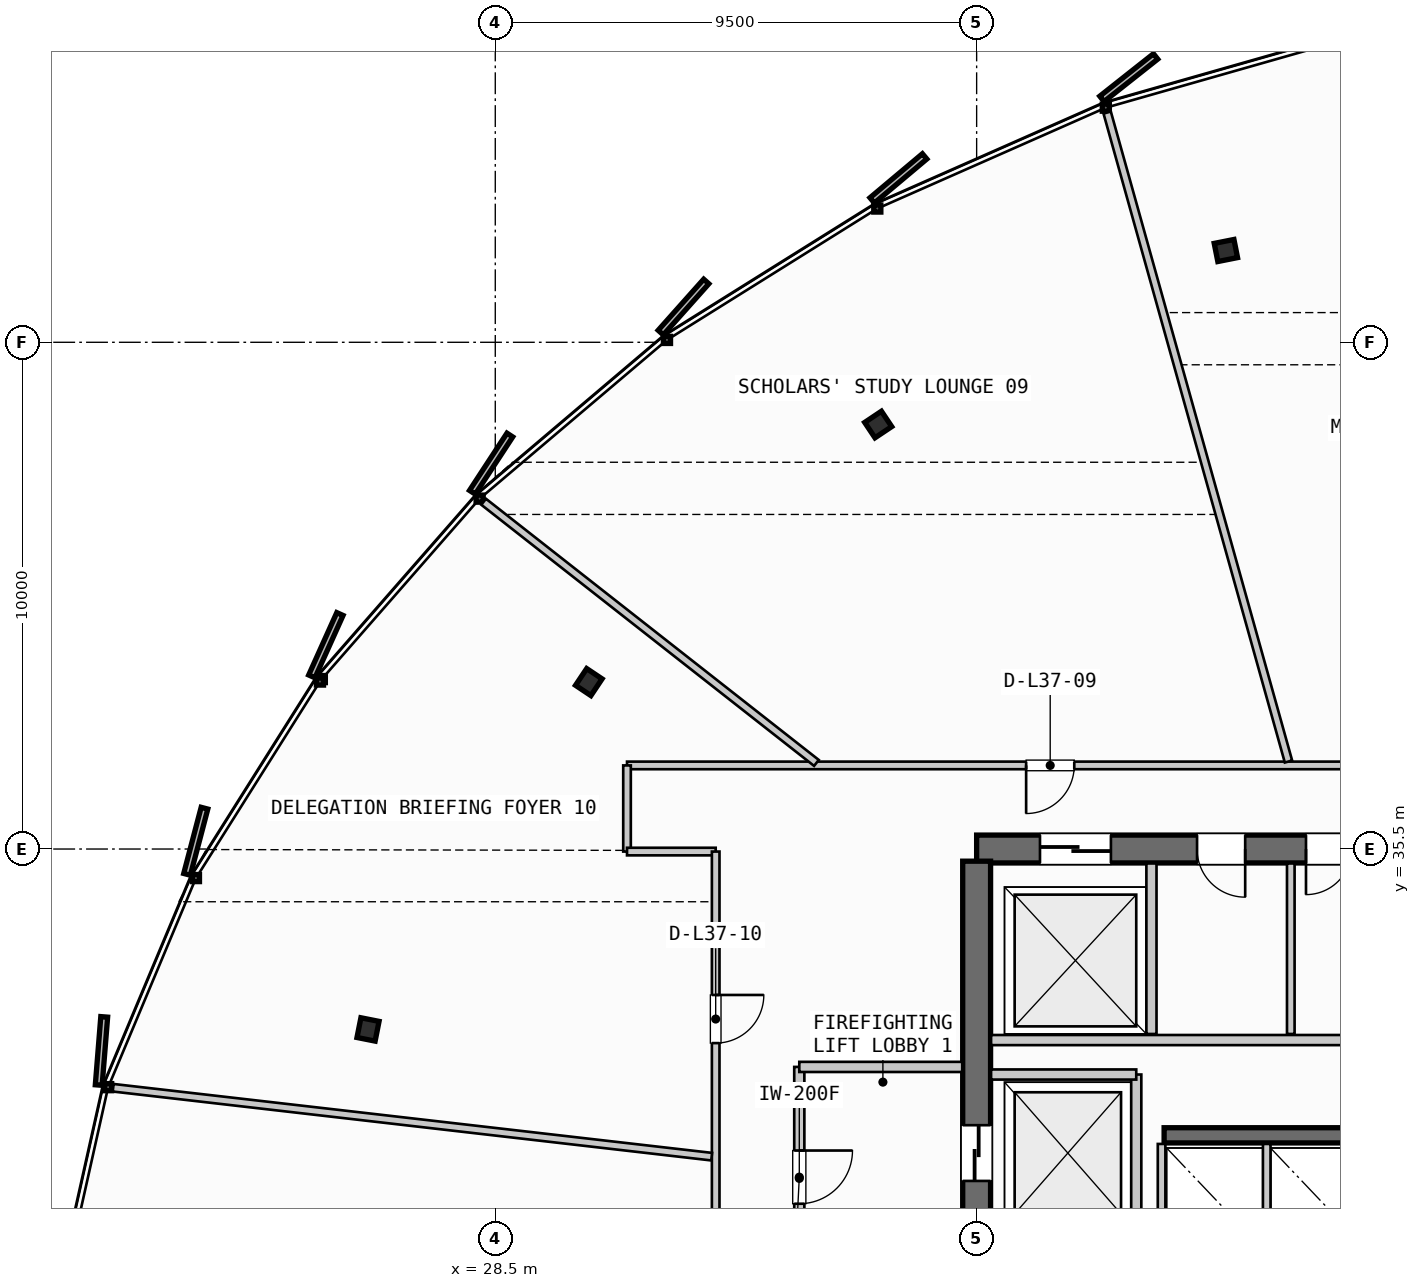
"""IFC4 building model, lengths in metres.
Left out: names, types, materials, properties, quantities, classifications, styles, units other than length and angle.
Written with IfcOpenShell. Run it as: python <this file> out.ifc"""

import sys

from ifc_helpers import new_model, si_unit, direction, frame, frame_2d, origin, origin_2d, place, context, subcontext, project, spatial, rectangle, i_section, extrude, source, transform, mapped, element, fill, save


model = new_model("IFC4")
c1 = context("Model", 3, precision=1e-05, world=origin(), true_north=direction((0.0, 1.0)))
c2 = subcontext(c1, "Body", "Model", "MODEL_VIEW")
j1 = project(units=[si_unit("LENGTHUNIT", "METRE"), si_unit("PLANEANGLEUNIT", "RADIAN")], contexts=[c1])
p1 = place(None, origin())
s1 = spatial("IfcSite", under=j1, at=p1, CompositionType="ELEMENT")
p2 = place(p1, origin())
s2 = spatial("IfcBuilding", under=s1, at=p2, CompositionType="ELEMENT")
p3 = place(p2, frame((0.0, 0.0, 146.55)))
s3 = spatial("IfcBuildingStorey", under=s2, at=p3, CompositionType="ELEMENT", Elevation=146.55)
p4 = place(p3, frame((55.6, 35.5, 0.0), z_axis=(0.0, 0.0, 1.0), x_axis=(-1.0, 0.0, 0.0)))
e1 = element("IfcWall", 1, at=p4, inside=s3, PredefinedType="SHEAR", context=c2, shape_type="SweptSolid", body=[
    extrude(rectangle(XDim=17.6, YDim=0.55, at=frame_2d((8.8, 0.0))), origin(), (0.0, 0.0, 1.0), 3.3),
])
p5 = place(p4, frame((8.05, 0.0, 0.0)))
e2 = element("IfcOpeningElement", 2, at=p5, cuts=e1, PredefinedType="OPENING", context=c2, shape_type="SweptSolid", body=[
    extrude(rectangle(XDim=1.5, YDim=2.2, at=frame_2d((0.75, 1.1))), frame((0.0, 0.285, 0.0), z_axis=(0.0, -1.0, 0.0), x_axis=(1.0, 0.0, 0.0)), (0.0, 0.0, 1.0), 0.57),
])
p6 = place(p4, frame((14.95, 0.0, 0.0)))
e3 = element("IfcOpeningElement", 3, at=p6, cuts=e1, PredefinedType="OPENING", context=c2, shape_type="SweptSolid", body=[
    extrude(rectangle(XDim=1.4, YDim=2.3, at=frame_2d((0.7, 1.15))), frame((0.0, 0.285, 0.0), z_axis=(0.0, -1.0, 0.0), x_axis=(1.0, 0.0, 0.0)), (0.0, 0.0, 1.0), 0.57),
])
p7 = place(p4, frame((12.3, 0.0, 0.0)))
e4 = element("IfcOpeningElement", 4, at=p7, cuts=e1, PredefinedType="OPENING", context=c2, shape_type="SweptSolid", body=[
    extrude(rectangle(XDim=0.95, YDim=2.15, at=frame_2d((0.475, 1.075))), frame((0.0, 0.285, 0.0), z_axis=(0.0, -1.0, 0.0), x_axis=(1.0, 0.0, 0.0)), (0.0, 0.0, 1.0), 0.57),
])
p8 = place(p4, frame((10.2, 0.0, 0.0)))
e5 = element("IfcOpeningElement", 5, at=p8, cuts=e1, PredefinedType="OPENING", context=c2, shape_type="SweptSolid", body=[
    extrude(rectangle(XDim=0.9, YDim=2.15, at=frame_2d((0.45, 1.075))), frame((0.0, 0.285, 0.0), z_axis=(0.0, -1.0, 0.0), x_axis=(1.0, 0.0, 0.0)), (0.0, 0.0, 1.0), 0.57),
])
p9 = place(p3, frame((38.0, 35.26, 0.0), z_axis=(0.0, 0.0, 1.0), x_axis=(0.0, -1.0, 0.0)))
e6 = element("IfcWall", 6, at=p9, inside=s3, PredefinedType="SHEAR", context=c2, shape_type="SweptSolid", body=[
    extrude(rectangle(XDim=14.92, YDim=0.55, at=frame_2d((7.46, 0.0))), origin(), (0.0, 0.0, 1.0), 3.3),
])
p10 = place(p9, frame((5.21, 0.0, 0.0)))
e7 = element("IfcOpeningElement", 7, at=p10, cuts=e6, PredefinedType="OPENING", context=c2, shape_type="SweptSolid", body=[
    extrude(rectangle(XDim=1.1, YDim=2.2, at=frame_2d((0.55, 1.1))), frame((0.0, 0.285, 0.0), z_axis=(0.0, -1.0, 0.0), x_axis=(1.0, 0.0, 0.0)), (0.0, 0.0, 1.0), 0.57),
])
p11 = place(p3, frame((41.7, 29.85, 0.0), z_axis=(0.0, 0.0, 1.0), x_axis=(1.0, 0.0, 0.0)))
e8 = element("IfcWall", 8, at=p11, inside=s3, PredefinedType="SHEAR", context=c2, shape_type="SweptSolid", body=[
    extrude(rectangle(XDim=4.25, YDim=0.3, at=frame_2d((2.125, 0.0))), origin(), (0.0, 0.0, 1.0), 3.3),
])
m1 = source(origin(), c2, "Body", "SweptSolid", [
    extrude(i_section(OverallWidth=0.397, OverallDepth=0.365, WebThickness=0.028, FlangeThickness=0.044, FilletRadius=0.015, at=origin_2d()), origin(), (0.0, 0.0, 1.0), 3.3),
])
for number, where, z_axis, x_axis in (
    (9, (42.919, 47.311, 0.0), (0.0, 0.0, 1.0), (-0.195, 0.981, 0.0)),
    (10, (36.058, 43.877, 0.0), (0.0, 0.0, 1.0), (-0.556, 0.831, 0.0)),
    (11, (30.346, 38.794, 0.0), (0.0, 0.0, 1.0), (-0.831, 0.556, 0.0)),
    (12, (25.989, 31.94, 0.0), (0.0, 0.0, 1.0), (-0.981, 0.195, 0.0)),
):
    element("IfcColumn", number, at=place(p3, frame(where, z_axis=z_axis, x_axis=x_axis)), inside=s3, PredefinedType="COLUMN", context=c2, shape_type="MappedRepresentation", body=[
        mapped(m1, transform((0.0, 0.0, 0.0), scale=1.0)),
    ])
p12 = place(p3, frame((41.15, 27.95, 0.0), z_axis=(0.0, 0.0, 1.0), x_axis=(0.0, 1.0, 0.0)))
e13 = element("IfcWall", 13, at=p12, inside=s3, PredefinedType="PARTITIONING", context=c2, shape_type="SweptSolid", body=[
    extrude(rectangle(XDim=3.1, YDim=0.2, at=frame_2d((1.55, 0.0))), origin(), (0.0, 0.0, 1.0), 2.305),
])
p13 = place(p3, frame((38.285, 31.05, 0.0), z_axis=(0.0, 0.0, 1.0), x_axis=(1.0, 0.0, 0.0)))
e14 = element("IfcWall", 14, at=p13, inside=s3, PredefinedType="PARTITIONING", context=c2, shape_type="SweptSolid", body=[
    extrude(rectangle(XDim=2.865, YDim=0.2, at=frame_2d((1.433, 0.0))), origin(), (0.0, 0.0, 1.0), 2.305),
])
p14 = place(p3, frame((34.5, 31.2, 0.0), z_axis=(0.0, 0.0, 1.0), x_axis=(0.0, -1.0, 0.0)))
e15 = element("IfcWall", 15, at=p14, inside=s3, PredefinedType="PARTITIONING", context=c2, shape_type="SweptSolid", body=[
    extrude(rectangle(XDim=4.4, YDim=0.2, at=frame_2d((2.2, 0.0))), origin(), (0.0, 0.0, 1.0), 2.305),
])
p15 = place(p14, frame((1.65, 0.0, 0.0)))
e16 = element("IfcOpeningElement", 16, at=p15, cuts=e15, PredefinedType="OPENING", context=c2, shape_type="SweptSolid", body=[
    extrude(rectangle(XDim=1.05, YDim=2.15, at=frame_2d((0.525, 1.075))), frame((0.0, 0.11, 0.0), z_axis=(0.0, -1.0, 0.0), x_axis=(1.0, 0.0, 0.0)), (0.0, 0.0, 1.0), 0.22),
])
p16 = place(p3, frame((34.5, 31.2, 0.0), z_axis=(0.0, 0.0, 1.0), x_axis=(1.0, 0.0, 0.0)))
e17 = element("IfcWall", 17, at=p16, inside=s3, PredefinedType="PARTITIONING", context=c2, shape_type="SweptSolid", body=[
    extrude(rectangle(XDim=3.215, YDim=0.2, at=frame_2d((1.607, 0.0))), origin(), (0.0, 0.0, 1.0), 2.305),
])
for number, where, z_axis, x_axis in (
    (18, (41.65, 27.41, 0.0), (0.0, 0.0, 1.0), (0.0, 1.0, 0.0)),
    (19, (43.725, 27.41, 0.0), (0.0, 0.0, 1.0), (0.0, 1.0, 0.0)),
):
    element("IfcWall", number, at=place(p3, frame(where, z_axis=z_axis, x_axis=x_axis)), inside=s3, PredefinedType="PARTITIONING", context=c2, shape_type="SweptSolid", body=[
        extrude(rectangle(XDim=2.27, YDim=0.15, at=frame_2d((1.135, 0.0))), origin(), (0.0, 0.0, 1.0), 2.305),
    ])
p17 = place(p3, frame((41.45, 31.85, 0.0), z_axis=(0.0, 0.0, 1.0), x_axis=(0.0, 1.0, 0.0)))
e20 = element("IfcWall", 20, at=p17, inside=s3, PredefinedType="PARTITIONING", context=c2, shape_type="SweptSolid", body=[
    extrude(rectangle(XDim=3.365, YDim=0.2, at=frame_2d((1.683, 0.0))), origin(), (0.0, 0.0, 1.0), 2.305),
])
p18 = place(p3, frame((38.285, 31.73, 0.0), z_axis=(0.0, 0.0, 1.0), x_axis=(1.0, 0.0, 0.0)))
e21 = element("IfcWall", 21, at=p18, inside=s3, PredefinedType="PARTITIONING", context=c2, shape_type="SweptSolid", body=[
    extrude(rectangle(XDim=7.515, YDim=0.2, at=frame_2d((3.758, 0.0))), origin(), (0.0, 0.0, 1.0), 2.305),
])
p19 = place(p3, frame((44.2, 31.85, 0.0), z_axis=(0.0, 0.0, 1.0), x_axis=(0.0, 1.0, 0.0)))
e22 = element("IfcWall", 22, at=p19, inside=s3, PredefinedType="PLUMBINGWALL", context=c2, shape_type="SweptSolid", body=[
    extrude(rectangle(XDim=3.365, YDim=0.15, at=frame_2d((1.683, 0.0))), origin(), (0.0, 0.0, 1.0), 2.305),
])
p20 = place(p3, frame((62.5, 37.15, 0.0), z_axis=(0.0, 0.0, 1.0), x_axis=(-1.0, 0.0, 0.0)))
e23 = element("IfcWall", 23, at=p20, inside=s3, PredefinedType="PARTITIONING", context=c2, shape_type="SweptSolid", body=[
    extrude(rectangle(XDim=31.4, YDim=0.15, at=frame_2d((15.7, 0.0))), origin(), (0.0, 0.0, 1.0), 2.305),
])
p21 = place(p20, frame((7.561, 0.0, 0.0)))
e24 = element("IfcOpeningElement", 24, at=p21, cuts=e23, PredefinedType="OPENING", context=c2, shape_type="SweptSolid", body=[
    extrude(rectangle(XDim=0.95, YDim=2.15, at=frame_2d((0.475, 1.075))), frame((0.0, 0.085, 0.0), z_axis=(0.0, -1.0, 0.0), x_axis=(1.0, 0.0, 0.0)), (0.0, 0.0, 1.0), 0.17),
])
p22 = place(p20, frame((13.901, 0.0, 0.0)))
e25 = element("IfcOpeningElement", 25, at=p22, cuts=e23, PredefinedType="OPENING", context=c2, shape_type="SweptSolid", body=[
    extrude(rectangle(XDim=0.95, YDim=2.15, at=frame_2d((0.475, 1.075))), frame((0.0, 0.085, 0.0), z_axis=(0.0, -1.0, 0.0), x_axis=(1.0, 0.0, 0.0)), (0.0, 0.0, 1.0), 0.17),
])
p23 = place(p20, frame((22.573, 0.0, 0.0)))
e26 = element("IfcOpeningElement", 26, at=p23, cuts=e23, PredefinedType="OPENING", context=c2, shape_type="SweptSolid", body=[
    extrude(rectangle(XDim=0.95, YDim=2.15, at=frame_2d((0.475, 1.075))), frame((0.0, 0.085, 0.0), z_axis=(0.0, -1.0, 0.0), x_axis=(1.0, 0.0, 0.0)), (0.0, 0.0, 1.0), 0.17),
])
p24 = place(p3, frame((31.1, 37.15, 0.0), z_axis=(0.0, 0.0, 1.0), x_axis=(0.0, -1.0, 0.0)))
e27 = element("IfcWall", 27, at=p24, inside=s3, PredefinedType="PARTITIONING", context=c2, shape_type="SweptSolid", body=[
    extrude(rectangle(XDim=1.7, YDim=0.15, at=frame_2d((0.85, 0.0))), origin(), (0.0, 0.0, 1.0), 2.305),
])
p25 = place(p3, frame((31.1, 35.45, 0.0), z_axis=(0.0, 0.0, 1.0), x_axis=(1.0, 0.0, 0.0)))
e28 = element("IfcWall", 28, at=p25, inside=s3, PredefinedType="PARTITIONING", context=c2, shape_type="SweptSolid", body=[
    extrude(rectangle(XDim=1.75, YDim=0.15, at=frame_2d((0.875, 0.0))), origin(), (0.0, 0.0, 1.0), 2.305),
])
p26 = place(p3, frame((32.85, 35.45, 0.0), z_axis=(0.0, 0.0, 1.0), x_axis=(0.0, -1.0, 0.0)))
e29 = element("IfcWall", 29, at=p26, inside=s3, PredefinedType="PARTITIONING", context=c2, shape_type="SweptSolid", body=[
    extrude(rectangle(XDim=15.3, YDim=0.15, at=frame_2d((7.65, 0.0))), origin(), (0.0, 0.0, 1.0), 2.305),
])
p27 = place(p26, frame((2.83, 0.0, 0.0)))
e30 = element("IfcOpeningElement", 30, at=p27, cuts=e29, PredefinedType="OPENING", context=c2, shape_type="SweptSolid", body=[
    extrude(rectangle(XDim=0.95, YDim=2.15, at=frame_2d((0.475, 1.075))), frame((0.0, 0.085, 0.0), z_axis=(0.0, -1.0, 0.0), x_axis=(1.0, 0.0, 0.0)), (0.0, 0.0, 1.0), 0.17),
])
p28 = place(p26, frame((9.899, 0.0, 0.0)))
e31 = element("IfcOpeningElement", 31, at=p28, cuts=e29, PredefinedType="OPENING", context=c2, shape_type="SweptSolid", body=[
    extrude(rectangle(XDim=0.95, YDim=2.15, at=frame_2d((0.475, 1.075))), frame((0.0, 0.085, 0.0), z_axis=(0.0, -1.0, 0.0), x_axis=(1.0, 0.0, 0.0)), (0.0, 0.0, 1.0), 0.17),
])
p29 = place(p3, frame((44.154, 37.227, 0.0), z_axis=(0.0, 0.0, 1.0), x_axis=(-0.269090511443, 0.963114892758, 0.0)))
e32 = element("IfcWall", 32, at=p29, inside=s3, PredefinedType="PARTITIONING", context=c2, shape_type="SweptSolid", body=[
    extrude(rectangle(XDim=13.297, YDim=0.15, at=frame_2d((6.648, 0.0))), origin(), (0.0, 0.0, 1.0), 2.305),
])
p30 = place(p3, frame((34.838, 37.199, 0.0), z_axis=(0.0, 0.0, 1.0), x_axis=(-0.786723081145, 0.617306077723, 0.0)))
e33 = element("IfcWall", 33, at=p30, inside=s3, PredefinedType="PARTITIONING", context=c2, shape_type="SweptSolid", body=[
    extrude(rectangle(XDim=8.348, YDim=0.15, at=frame_2d((4.174, 0.0))), origin(), (0.0, 0.0, 1.0), 2.305),
])
p31 = place(p3, frame((32.771, 29.429, 0.0), z_axis=(0.0, 0.0, 1.0), x_axis=(-0.993435617558, 0.114392629863, 0.0)))
e34 = element("IfcWall", 34, at=p31, inside=s3, PredefinedType="PARTITIONING", context=c2, shape_type="SweptSolid", body=[
    extrude(rectangle(XDim=11.89, YDim=0.15, at=frame_2d((5.945, 0.0))), origin(), (0.0, 0.0, 1.0), 2.305),
])
m2 = source(origin(), c2, "Body", "SweptSolid", [
    extrude(rectangle(XDim=1.1, YDim=2.2, at=frame_2d((0.55, 1.1))), frame((0.0, 0.025, 0.0), z_axis=(0.0, -1.0, 0.0), x_axis=(1.0, 0.0, 0.0)), (0.0, 0.0, 1.0), 0.05),
])
p32 = place(p10, origin())
e35 = element("IfcDoor", 35, at=p32, inside=s3, OperationType="SLIDING_TO_LEFT", PredefinedType="DOOR", context=c2, shape_type="MappedRepresentation", body=[
    mapped(m2, transform((0.0, 0.0, 0.0), scale=1.0)),
])
fill(e7, e35)
m3 = source(origin(), c2, "Body", "SweptSolid", [
    extrude(rectangle(XDim=1.4, YDim=2.3, at=frame_2d((0.7, 1.15))), frame((0.0, 0.025, 0.0), z_axis=(0.0, -1.0, 0.0), x_axis=(1.0, 0.0, 0.0)), (0.0, 0.0, 1.0), 0.05),
])
p33 = place(p6, origin())
e36 = element("IfcDoor", 36, at=p33, inside=s3, OperationType="SLIDING_TO_RIGHT", PredefinedType="DOOR", context=c2, shape_type="MappedRepresentation", body=[
    mapped(m3, transform((0.0, 0.0, 0.0), scale=1.0)),
])
fill(e3, e36)
m4 = source(origin(), c2, "Body", "SweptSolid", [
    extrude(rectangle(XDim=0.95, YDim=2.15, at=frame_2d((0.475, 1.075))), frame((0.0, 0.025, 0.0), z_axis=(0.0, -1.0, 0.0), x_axis=(1.0, 0.0, 0.0)), (0.0, 0.0, 1.0), 0.05),
])
p34 = place(p7, origin())
e37 = element("IfcDoor", 37, at=p34, inside=s3, OperationType="SINGLE_SWING_LEFT", PredefinedType="DOOR", context=c2, shape_type="MappedRepresentation", body=[
    mapped(m4, transform((0.0, 0.0, 0.0), scale=1.0)),
])
fill(e4, e37)
m5 = source(origin(), c2, "Body", "SweptSolid", [
    extrude(rectangle(XDim=0.9, YDim=2.15, at=frame_2d((0.45, 1.075))), frame((0.0, 0.025, 0.0), z_axis=(0.0, -1.0, 0.0), x_axis=(1.0, 0.0, 0.0)), (0.0, 0.0, 1.0), 0.05),
])
p35 = place(p8, origin())
e38 = element("IfcDoor", 38, at=p35, inside=s3, OperationType="SINGLE_SWING_RIGHT", PredefinedType="DOOR", context=c2, shape_type="MappedRepresentation", body=[
    mapped(m5, transform((0.0, 0.0, 0.0), scale=1.0)),
])
fill(e5, e38)
m6 = source(origin(), c2, "Body", "SweptSolid", [
    extrude(rectangle(XDim=1.05, YDim=2.15, at=frame_2d((0.525, 1.075))), frame((0.0, 0.025, 0.0), z_axis=(0.0, -1.0, 0.0), x_axis=(1.0, 0.0, 0.0)), (0.0, 0.0, 1.0), 0.05),
])
p36 = place(p15, origin())
e39 = element("IfcDoor", 39, at=p36, inside=s3, OperationType="SINGLE_SWING_LEFT", PredefinedType="DOOR", context=c2, shape_type="MappedRepresentation", body=[
    mapped(m6, transform((0.0, 0.0, 0.0), scale=1.0)),
])
fill(e16, e39)
p37 = place(p23, origin())
e40 = element("IfcDoor", 40, at=p37, inside=s3, OperationType="SINGLE_SWING_RIGHT", PredefinedType="DOOR", context=c2, shape_type="MappedRepresentation", body=[
    mapped(m4, transform((0.0, 0.0, 0.0), scale=1.0)),
])
fill(e26, e40)
p38 = place(p27, origin())
e41 = element("IfcDoor", 41, at=p38, inside=s3, OperationType="SINGLE_SWING_LEFT", PredefinedType="DOOR", context=c2, shape_type="MappedRepresentation", body=[
    mapped(m4, transform((0.0, 0.0, 0.0), scale=1.0)),
])
fill(e30, e41)
save(model, sys.argv[1])
